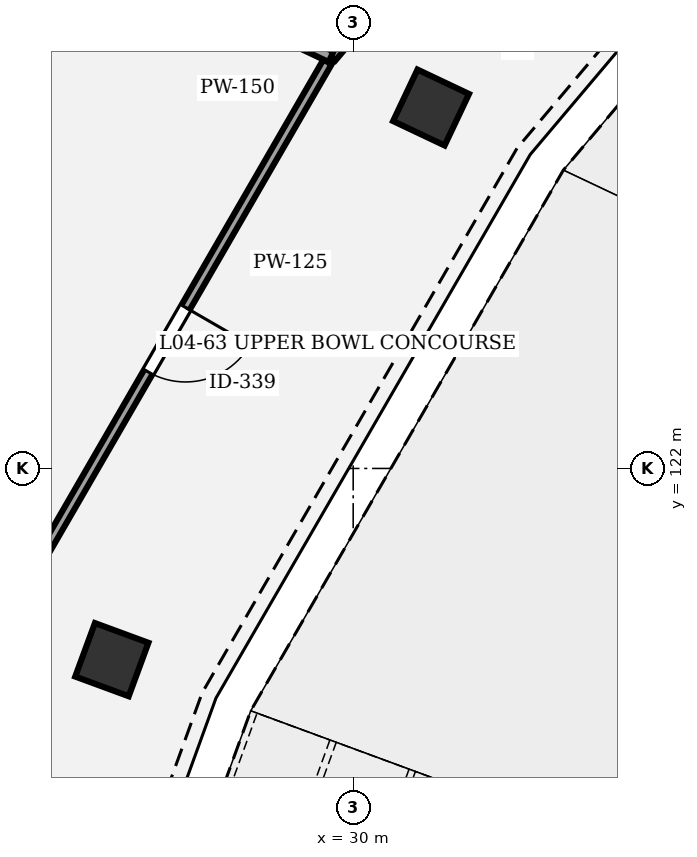
"""IFC4 building model, lengths in metres.
Left out: names, types, materials, properties, quantities, classifications, styles, units other than length and angle.
Written with IfcOpenShell. Run it as: python <this file> out.ifc"""

import sys

from ifc_helpers import new_model, si_unit, direction, frame, frame_2d, origin, origin_2d, place, context, subcontext, project, spatial, rectangle, extrude, element, fill, save


model = new_model("IFC4")
c1 = context("Model", 3, precision=1e-05, world=origin(), true_north=direction((0.0, 1.0)))
c2 = subcontext(c1, "Body", "Model", "MODEL_VIEW")
j1 = project(units=[si_unit("LENGTHUNIT", "METRE"), si_unit("PLANEANGLEUNIT", "RADIAN")], contexts=[c1])
p1 = place(None, origin())
s1 = spatial("IfcSite", under=j1, at=p1, CompositionType="ELEMENT")
p2 = place(p1, origin())
s2 = spatial("IfcBuilding", under=s1, at=p2, CompositionType="ELEMENT")
p3 = place(p2, frame((0.0, 0.0, 19.2)))
s3 = spatial("IfcBuildingStorey", under=s2, at=p3, CompositionType="ELEMENT", Elevation=19.2)
for number, where, z_axis, x_axis in (
    (1, (31.024, 126.748, 0.0), (0.0, 0.0, 1.0), (-0.904, 0.428, 0.0)),
    (2, (26.824, 119.484, 0.0), (0.0, 0.0, 1.0), (-0.938, 0.346, 0.0)),
):
    element("IfcColumn", number, at=place(p3, frame(where, z_axis=z_axis, x_axis=x_axis)), inside=s3, PredefinedType="COLUMN", context=c2, shape_type="SweptSolid", body=[
        extrude(rectangle(XDim=0.75, YDim=0.75, at=origin_2d()), origin(), (0.0, 0.0, 1.0), 4.8),
    ])
p4 = place(p3, frame((33.26, 131.622, 0.0), z_axis=(0.0, 0.0, 1.0), x_axis=(-0.645138826346, -0.764065373343, 0.0)))
e3 = element("IfcWall", 3, at=p4, inside=s3, PredefinedType="PARTITIONING", context=c2, shape_type="SweptSolid", body=[
    extrude(rectangle(XDim=5.506, YDim=0.15, at=frame_2d((2.753, 0.0))), origin(), (0.0, 0.0, 1.0), 3.55),
])
p5 = place(p4, frame((0.516, 0.0, 0.0)))
e4 = element("IfcOpeningElement", 4, at=p5, cuts=e3, PredefinedType="OPENING", context=c2, shape_type="SweptSolid", body=[
    extrude(rectangle(XDim=0.94, YDim=2.2, at=frame_2d((0.47, 1.1))), frame((0.0, 0.085, 0.0), z_axis=(0.0, -1.0, 0.0), x_axis=(1.0, 0.0, 0.0)), (0.0, 0.0, 1.0), 0.17),
])
p6 = place(p3, frame((29.663, 127.349, 0.0), z_axis=(0.0, 0.0, 1.0), x_axis=(-0.500563217362, -0.865699985806, 0.0)))
e5 = element("IfcWall", 5, at=p6, inside=s3, PredefinedType="PARTITIONING", context=c2, shape_type="SweptSolid", body=[
    extrude(rectangle(XDim=8.444, YDim=0.125, at=frame_2d((4.222, 0.0))), origin(), (0.0, 0.0, 1.0), 3.55),
])
p7 = place(p6, frame((3.732, 0.0, 0.0)))
e6 = element("IfcOpeningElement", 6, at=p7, cuts=e5, PredefinedType="OPENING", context=c2, shape_type="SweptSolid", body=[
    extrude(rectangle(XDim=0.98, YDim=2.2, at=frame_2d((0.49, 1.1))), frame((0.0, 0.073, 0.0), z_axis=(0.0, -1.0, 0.0), x_axis=(1.0, 0.0, 0.0)), (0.0, 0.0, 1.0), 0.145),
])
p8 = place(p3, frame((29.708, 127.416, 0.0), z_axis=(0.0, 0.0, 1.0), x_axis=(-0.903864816712, 0.42781817763, 0.0)))
e7 = element("IfcWall", 7, at=p8, inside=s3, PredefinedType="PARTITIONING", context=c2, shape_type="SweptSolid", body=[
    extrude(rectangle(XDim=6.849, YDim=0.15, at=frame_2d((3.425, 0.0))), origin(), (0.0, 0.0, 1.0), 3.55),
])
p9 = place(p7, origin())
e8 = element("IfcDoor", 8, at=p9, inside=s3, OperationType="SINGLE_SWING_LEFT", PredefinedType="DOOR", context=c2, shape_type="SweptSolid", body=[
    extrude(rectangle(XDim=0.98, YDim=2.2, at=frame_2d((0.49, 1.1))), frame((0.0, 0.025, 0.0), z_axis=(0.0, -1.0, 0.0), x_axis=(1.0, 0.0, 0.0)), (0.0, 0.0, 1.0), 0.05),
])
fill(e6, e8)
save(model, sys.argv[1])
